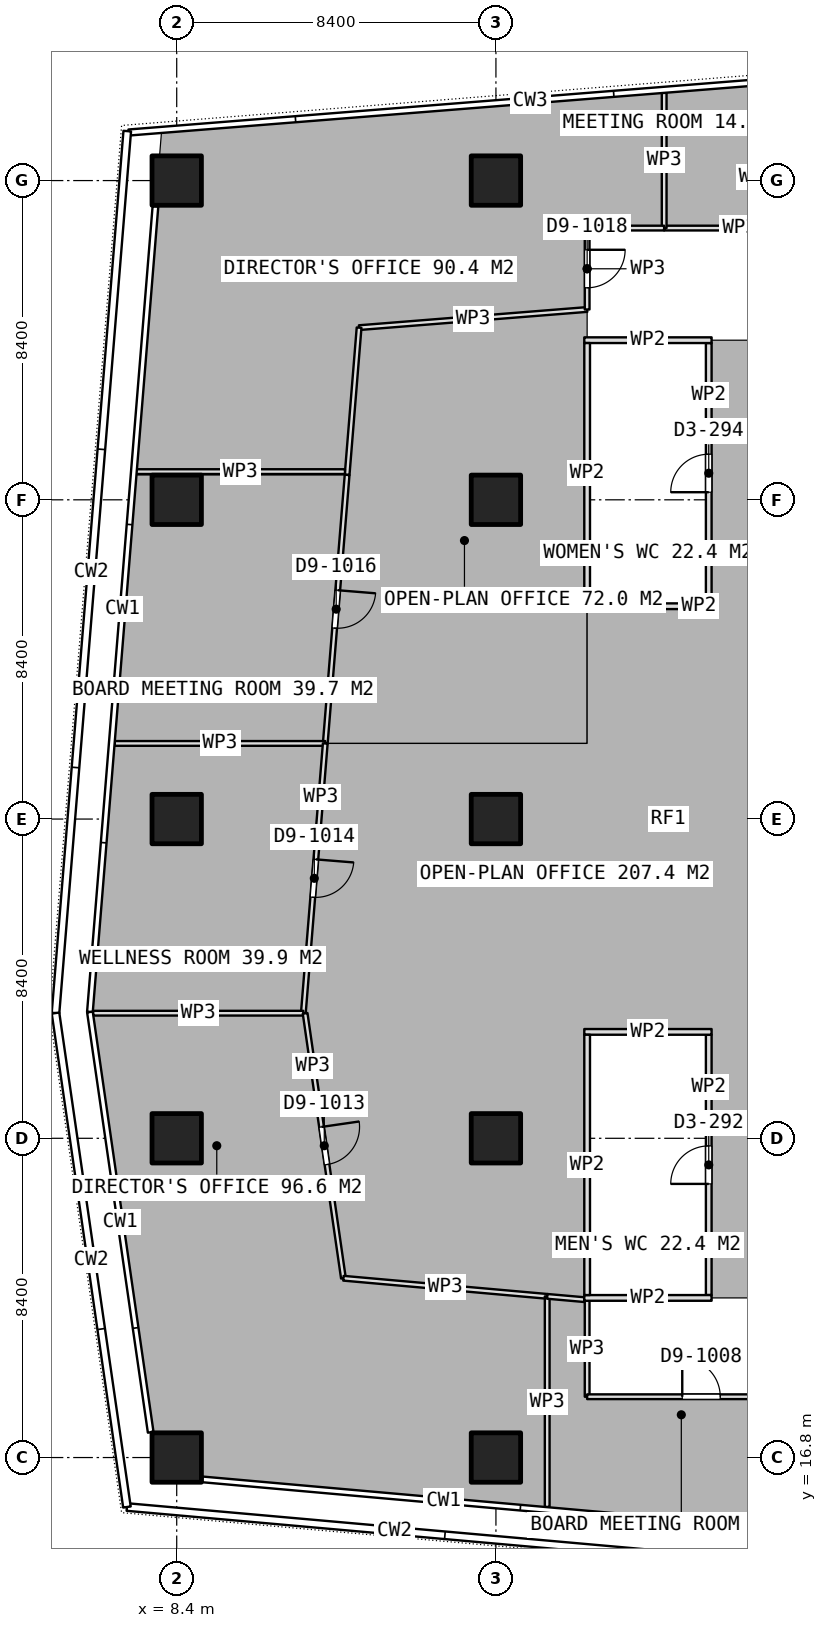
"""IFC4 building model, lengths in metres.
Left out: names, types, materials, properties, quantities, classifications, styles, units other than length and angle.
Written with IfcOpenShell. Run it as: python <this file> out.ifc"""

import sys

from ifc_helpers import new_model, si_unit, direction, frame, frame_2d, origin, origin_2d, place, context, subcontext, project, spatial, rectangle, extrude, element, fill, save


model = new_model("IFC4")
c1 = context("Model", 3, precision=1e-05, world=origin(), true_north=direction((0.0, 1.0)))
c2 = subcontext(c1, "Body", "Model", "MODEL_VIEW")
j1 = project(units=[si_unit("LENGTHUNIT", "METRE"), si_unit("PLANEANGLEUNIT", "RADIAN")], contexts=[c1])
p1 = place(None, origin())
s1 = spatial("IfcSite", under=j1, at=p1, CompositionType="ELEMENT")
p2 = place(p1, origin())
s2 = spatial("IfcBuilding", under=s1, at=p2, CompositionType="ELEMENT")
p3 = place(p2, frame((0.0, 0.0, 272.6)))
s3 = spatial("IfcBuildingStorey", under=s2, at=p3, CompositionType="ELEMENT", Elevation=272.6)
for number, where, z_axis, x_axis in (
    (1, (8.4, 16.8, 0.0), (0.0, 0.0, 1.0), (1.0, 0.0, 0.0)),
    (2, (8.4, 25.2, 0.0), (0.0, 0.0, 1.0), (1.0, 0.0, 0.0)),
    (3, (8.4, 33.6, 0.0), (0.0, 0.0, 1.0), (1.0, 0.0, 0.0)),
    (4, (8.4, 42.0, 0.0), (0.0, 0.0, 1.0), (1.0, 0.0, 0.0)),
    (5, (8.4, 50.4, 0.0), (0.0, 0.0, 1.0), (1.0, 0.0, 0.0)),
    (6, (16.8, 16.8, 0.0), (0.0, 0.0, 1.0), (1.0, 0.0, 0.0)),
    (7, (16.8, 25.2, 0.0), (0.0, 0.0, 1.0), (1.0, 0.0, 0.0)),
    (8, (16.8, 33.6, 0.0), (0.0, 0.0, 1.0), (1.0, 0.0, 0.0)),
    (9, (16.8, 42.0, 0.0), (0.0, 0.0, 1.0), (1.0, 0.0, 0.0)),
    (10, (16.8, 50.4, 0.0), (0.0, 0.0, 1.0), (1.0, 0.0, 0.0)),
):
    element("IfcColumn", number, at=place(p3, frame(where, z_axis=z_axis, x_axis=x_axis)), inside=s3, PredefinedType="COLUMN", context=c2, shape_type="SweptSolid", body=[
        extrude(rectangle(XDim=1.3, YDim=1.3, at=origin_2d()), origin(), (0.0, 0.0, 1.0), 3.75),
    ])
for number, where, z_axis, x_axis in (
    (11, (19.125, 39.2, 0.0), (0.0, 0.0, 1.0), (1.0, 0.0, 0.0)),
    (12, (19.125, 46.2, 0.0), (0.0, 0.0, 1.0), (1.0, 0.0, 0.0)),
):
    element("IfcWall", number, at=place(p3, frame(where, z_axis=z_axis, x_axis=x_axis)), inside=s3, PredefinedType="PARTITIONING", context=c2, shape_type="SweptSolid", body=[
        extrude(rectangle(XDim=3.35, YDim=0.15, at=frame_2d((1.675, 0.0))), origin(), (0.0, 0.0, 1.0), 3.5),
    ])
p4 = place(p3, frame((19.2, 39.275, 0.0), z_axis=(0.0, 0.0, 1.0), x_axis=(0.0, 1.0, 0.0)))
e13 = element("IfcWall", 13, at=p4, inside=s3, PredefinedType="PARTITIONING", context=c2, shape_type="SweptSolid", body=[
    extrude(rectangle(XDim=6.85, YDim=0.15, at=frame_2d((3.425, 0.0))), origin(), (0.0, 0.0, 1.0), 3.5),
])
p5 = place(p3, frame((22.4, 39.275, 0.0), z_axis=(0.0, 0.0, 1.0), x_axis=(0.0, 1.0, 0.0)))
e14 = element("IfcWall", 14, at=p5, inside=s3, PredefinedType="PARTITIONING", context=c2, shape_type="SweptSolid", body=[
    extrude(rectangle(XDim=6.85, YDim=0.15, at=frame_2d((3.425, 0.0))), origin(), (0.0, 0.0, 1.0), 3.5),
])
p6 = place(p5, frame((2.925, 0.0, 0.0)))
e15 = element("IfcOpeningElement", 15, at=p6, cuts=e14, PredefinedType="OPENING", context=c2, shape_type="SweptSolid", body=[
    extrude(rectangle(XDim=1.0, YDim=2.1, at=frame_2d((0.5, 1.05))), frame((0.0, 0.085, 0.0), z_axis=(0.0, -1.0, 0.0), x_axis=(1.0, 0.0, 0.0)), (0.0, 0.0, 1.0), 0.17),
])
for number, where, z_axis, x_axis in (
    (16, (19.125, 21.0, 0.0), (0.0, 0.0, 1.0), (1.0, 0.0, 0.0)),
    (17, (19.125, 28.0, 0.0), (0.0, 0.0, 1.0), (1.0, 0.0, 0.0)),
):
    element("IfcWall", number, at=place(p3, frame(where, z_axis=z_axis, x_axis=x_axis)), inside=s3, PredefinedType="PARTITIONING", context=c2, shape_type="SweptSolid", body=[
        extrude(rectangle(XDim=3.35, YDim=0.15, at=frame_2d((1.675, 0.0))), origin(), (0.0, 0.0, 1.0), 3.5),
    ])
p7 = place(p3, frame((19.2, 21.075, 0.0), z_axis=(0.0, 0.0, 1.0), x_axis=(0.0, 1.0, 0.0)))
e18 = element("IfcWall", 18, at=p7, inside=s3, PredefinedType="PARTITIONING", context=c2, shape_type="SweptSolid", body=[
    extrude(rectangle(XDim=6.85, YDim=0.15, at=frame_2d((3.425, 0.0))), origin(), (0.0, 0.0, 1.0), 3.5),
])
p8 = place(p3, frame((22.4, 21.075, 0.0), z_axis=(0.0, 0.0, 1.0), x_axis=(0.0, 1.0, 0.0)))
e19 = element("IfcWall", 19, at=p8, inside=s3, PredefinedType="PARTITIONING", context=c2, shape_type="SweptSolid", body=[
    extrude(rectangle(XDim=6.85, YDim=0.15, at=frame_2d((3.425, 0.0))), origin(), (0.0, 0.0, 1.0), 3.5),
])
p9 = place(p8, frame((2.925, 0.0, 0.0)))
e20 = element("IfcOpeningElement", 20, at=p9, cuts=e19, PredefinedType="OPENING", context=c2, shape_type="SweptSolid", body=[
    extrude(rectangle(XDim=1.0, YDim=2.1, at=frame_2d((0.5, 1.05))), frame((0.0, 0.085, 0.0), z_axis=(0.0, -1.0, 0.0), x_axis=(1.0, 0.0, 0.0)), (0.0, 0.0, 1.0), 0.17),
])
p10 = place(p3, frame((25.205, 49.15, 0.0), z_axis=(0.0, 0.0, 1.0), x_axis=(-1.0, 0.0, 0.0)))
e21 = element("IfcWall", 21, at=p10, inside=s3, PredefinedType="PARTITIONING", context=c2, shape_type="SweptSolid", body=[
    extrude(rectangle(XDim=3.978, YDim=0.125, at=frame_2d((1.989, 0.0))), origin(), (0.0, 0.0, 1.0), 3.5),
])
p11 = place(p3, frame((21.227, 49.15, 0.0), z_axis=(0.0, 0.0, 1.0), x_axis=(0.0, 1.0, 0.0)))
e22 = element("IfcWall", 22, at=p11, inside=s3, PredefinedType="PARTITIONING", context=c2, shape_type="SweptSolid", body=[
    extrude(rectangle(XDim=3.558, YDim=0.125, at=frame_2d((1.779, 0.0))), origin(), (0.0, 0.0, 1.0), 3.5),
])
p12 = place(p3, frame((19.2, 47.008, 0.0), z_axis=(0.0, 0.0, 1.0), x_axis=(-0.996842300725, -0.079406721921, 0.0)))
e23 = element("IfcWall", 23, at=p12, inside=s3, PredefinedType="PARTITIONING", context=c2, shape_type="SweptSolid", body=[
    extrude(rectangle(XDim=6.02, YDim=0.125, at=frame_2d((3.01, 0.0))), origin(), (0.0, 0.0, 1.0), 3.5),
])
p13 = place(p3, frame((13.199, 46.53, 0.0), z_axis=(0.0, 0.0, 1.0), x_axis=(-0.081048669132, -0.996710145043, 0.0)))
e24 = element("IfcWall", 24, at=p13, inside=s3, PredefinedType="PARTITIONING", context=c2, shape_type="SweptSolid", body=[
    extrude(rectangle(XDim=3.886, YDim=0.125, at=frame_2d((1.943, 0.0))), origin(), (0.0, 0.0, 1.0), 3.5),
])
p14 = place(p3, frame((12.828, 42.742, 0.0), z_axis=(0.0, 0.0, 1.0), x_axis=(-1.0, 0.0, 0.0)))
e25 = element("IfcWall", 25, at=p14, inside=s3, PredefinedType="PARTITIONING", context=c2, shape_type="SweptSolid", body=[
    extrude(rectangle(XDim=5.505, YDim=0.125, at=frame_2d((2.752, 0.0))), origin(), (0.0, 0.0, 1.0), 3.5),
])
p15 = place(p3, frame((21.226, 49.15, 0.0), z_axis=(0.0, 0.0, 1.0), x_axis=(-1.0, 0.0, 0.0)))
e26 = element("IfcWall", 26, at=p15, inside=s3, PredefinedType="PARTITIONING", context=c2, shape_type="SweptSolid", body=[
    extrude(rectangle(XDim=2.026, YDim=0.125, at=frame_2d((1.013, 0.0))), origin(), (0.0, 0.0, 1.0), 3.5),
])
p16 = place(p3, frame((19.2, 49.15, 0.0), z_axis=(0.0, 0.0, 1.0), x_axis=(0.0, -1.0, 0.0)))
e27 = element("IfcWall", 27, at=p16, inside=s3, PredefinedType="PARTITIONING", context=c2, shape_type="SweptSolid", body=[
    extrude(rectangle(XDim=2.142, YDim=0.125, at=frame_2d((1.071, 0.0))), origin(), (0.0, 0.0, 1.0), 3.5),
])
p17 = place(p16, frame((0.571, 0.0, 0.0)))
e28 = element("IfcOpeningElement", 28, at=p17, cuts=e27, PredefinedType="OPENING", context=c2, shape_type="SweptSolid", body=[
    extrude(rectangle(XDim=1.0, YDim=2.1, at=frame_2d((0.5, 1.05))), frame((0.0, 0.073, 0.0), z_axis=(0.0, -1.0, 0.0), x_axis=(1.0, 0.0, 0.0)), (0.0, 0.0, 1.0), 0.145),
])
p18 = place(p3, frame((12.884, 42.656, 0.0), z_axis=(0.0, 0.0, 1.0), x_axis=(-0.08110159124, -0.996705840205, 0.0)))
e29 = element("IfcWall", 29, at=p18, inside=s3, PredefinedType="PARTITIONING", context=c2, shape_type="SweptSolid", body=[
    extrude(rectangle(XDim=7.089, YDim=0.125, at=frame_2d((3.545, 0.0))), origin(), (0.0, 0.0, 1.0), 3.5),
])
p19 = place(p18, frame((3.045, 0.0, 0.0)))
e30 = element("IfcOpeningElement", 30, at=p19, cuts=e29, PredefinedType="OPENING", context=c2, shape_type="SweptSolid", body=[
    extrude(rectangle(XDim=1.0, YDim=2.1, at=frame_2d((0.5, 1.05))), frame((0.0, 0.073, 0.0), z_axis=(0.0, -1.0, 0.0), x_axis=(1.0, 0.0, 0.0)), (0.0, 0.0, 1.0), 0.145),
])
p20 = place(p3, frame((12.309, 35.59, 0.0), z_axis=(0.0, 0.0, 1.0), x_axis=(-1.0, 0.0, 0.0)))
e31 = element("IfcWall", 31, at=p20, inside=s3, PredefinedType="PARTITIONING", context=c2, shape_type="SweptSolid", body=[
    extrude(rectangle(XDim=5.538, YDim=0.125, at=frame_2d((2.769, 0.0))), origin(), (0.0, 0.0, 1.0), 3.5),
])
p21 = place(p3, frame((12.309, 35.589, 0.0), z_axis=(0.0, 0.0, 1.0), x_axis=(-0.081053384124, -0.996709761627, 0.0)))
e32 = element("IfcWall", 32, at=p21, inside=s3, PredefinedType="PARTITIONING", context=c2, shape_type="SweptSolid", body=[
    extrude(rectangle(XDim=7.121, YDim=0.125, at=frame_2d((3.56, 0.0))), origin(), (0.0, 0.0, 1.0), 3.5),
])
p22 = place(p21, frame((3.06, 0.0, 0.0)))
e33 = element("IfcOpeningElement", 33, at=p22, cuts=e32, PredefinedType="OPENING", context=c2, shape_type="SweptSolid", body=[
    extrude(rectangle(XDim=1.0, YDim=2.1, at=frame_2d((0.5, 1.05))), frame((0.0, 0.073, 0.0), z_axis=(0.0, -1.0, 0.0), x_axis=(1.0, 0.0, 0.0)), (0.0, 0.0, 1.0), 0.145),
])
p23 = place(p3, frame((11.732, 28.492, 0.0), z_axis=(0.0, 0.0, 1.0), x_axis=(-1.0, 0.0, 0.0)))
e34 = element("IfcWall", 34, at=p23, inside=s3, PredefinedType="PARTITIONING", context=c2, shape_type="SweptSolid", body=[
    extrude(rectangle(XDim=5.531, YDim=0.125, at=frame_2d((2.766, 0.0))), origin(), (0.0, 0.0, 1.0), 3.5),
])
p24 = place(p3, frame((11.779, 28.488, 0.0), z_axis=(0.0, 0.0, 1.0), x_axis=(0.143139230014, -0.989702561799, 0.0)))
e35 = element("IfcWall", 35, at=p24, inside=s3, PredefinedType="PARTITIONING", context=c2, shape_type="SweptSolid", body=[
    extrude(rectangle(XDim=7.042, YDim=0.125, at=frame_2d((3.521, 0.0))), origin(), (0.0, 0.0, 1.0), 3.5),
])
p25 = place(p24, frame((3.02, 0.0, 0.0)))
e36 = element("IfcOpeningElement", 36, at=p25, cuts=e35, PredefinedType="OPENING", context=c2, shape_type="SweptSolid", body=[
    extrude(rectangle(XDim=1.0, YDim=2.1, at=frame_2d((0.5, 1.05))), frame((0.0, 0.073, 0.0), z_axis=(0.0, -1.0, 0.0), x_axis=(1.0, 0.0, 0.0)), (0.0, 0.0, 1.0), 0.145),
])
p26 = place(p3, frame((12.787, 21.518, 0.0), z_axis=(0.0, 0.0, 1.0), x_axis=(0.996065348673, -0.088621787237, 0.0)))
e37 = element("IfcWall", 37, at=p26, inside=s3, PredefinedType="PARTITIONING", context=c2, shape_type="SweptSolid", body=[
    extrude(rectangle(XDim=5.383, YDim=0.125, at=frame_2d((2.691, 0.0))), origin(), (0.0, 0.0, 1.0), 3.5),
])
p27 = place(p3, frame((18.149, 21.041, 0.0), z_axis=(0.0, 0.0, 1.0), x_axis=(0.0, -1.0, 0.0)))
e38 = element("IfcWall", 38, at=p27, inside=s3, PredefinedType="PARTITIONING", context=c2, shape_type="SweptSolid", body=[
    extrude(rectangle(XDim=5.541, YDim=0.125, at=frame_2d((2.771, 0.0))), origin(), (0.0, 0.0, 1.0), 3.5),
])
p28 = place(p3, frame((18.15, 21.041, 0.0), z_axis=(0.0, 0.0, 1.0), x_axis=(0.996138836376, -0.087791905459, 0.0)))
e39 = element("IfcWall", 39, at=p28, inside=s3, PredefinedType="PARTITIONING", context=c2, shape_type="SweptSolid", body=[
    extrude(rectangle(XDim=0.979, YDim=0.125, at=frame_2d((0.489, 0.0))), origin(), (0.0, 0.0, 1.0), 3.5),
])
p29 = place(p3, frame((19.2, 20.925, 0.0), z_axis=(0.0, 0.0, 1.0), x_axis=(0.0, -1.0, 0.0)))
e40 = element("IfcWall", 40, at=p29, inside=s3, PredefinedType="PARTITIONING", context=c2, shape_type="SweptSolid", body=[
    extrude(rectangle(XDim=2.525, YDim=0.125, at=frame_2d((1.263, 0.0))), origin(), (0.0, 0.0, 1.0), 3.5),
])
p30 = place(p3, frame((19.2, 18.4, 0.0), z_axis=(0.0, 0.0, 1.0), x_axis=(1.0, 0.0, 0.0)))
e41 = element("IfcWall", 41, at=p30, inside=s3, PredefinedType="PARTITIONING", context=c2, shape_type="SweptSolid", body=[
    extrude(rectangle(XDim=6.006, YDim=0.125, at=frame_2d((3.003, 0.0))), origin(), (0.0, 0.0, 1.0), 3.5),
])
p31 = place(p30, frame((2.503, 0.0, 0.0)))
e42 = element("IfcOpeningElement", 42, at=p31, cuts=e41, PredefinedType="OPENING", context=c2, shape_type="SweptSolid", body=[
    extrude(rectangle(XDim=1.0, YDim=2.1, at=frame_2d((0.5, 1.05))), frame((0.0, 0.073, 0.0), z_axis=(0.0, -1.0, 0.0), x_axis=(1.0, 0.0, 0.0)), (0.0, 0.0, 1.0), 0.145),
])
p32 = place(p6, origin())
e43 = element("IfcDoor", 43, at=p32, inside=s3, OperationType="SINGLE_SWING_LEFT", PredefinedType="DOOR", context=c2, shape_type="SweptSolid", body=[
    extrude(rectangle(XDim=1.0, YDim=2.1, at=frame_2d((0.5, 1.05))), frame((0.0, 0.025, 0.0), z_axis=(0.0, -1.0, 0.0), x_axis=(1.0, 0.0, 0.0)), (0.0, 0.0, 1.0), 0.05),
])
fill(e15, e43)
p33 = place(p9, origin())
e44 = element("IfcDoor", 44, at=p33, inside=s3, OperationType="SINGLE_SWING_LEFT", PredefinedType="DOOR", context=c2, shape_type="SweptSolid", body=[
    extrude(rectangle(XDim=1.0, YDim=2.1, at=frame_2d((0.5, 1.05))), frame((0.0, 0.025, 0.0), z_axis=(0.0, -1.0, 0.0), x_axis=(1.0, 0.0, 0.0)), (0.0, 0.0, 1.0), 0.05),
])
fill(e20, e44)
p34 = place(p17, origin())
e45 = element("IfcDoor", 45, at=p34, inside=s3, OperationType="SINGLE_SWING_LEFT", PredefinedType="DOOR", context=c2, shape_type="SweptSolid", body=[
    extrude(rectangle(XDim=1.0, YDim=2.1, at=frame_2d((0.5, 1.05))), frame((0.0, 0.025, 0.0), z_axis=(0.0, -1.0, 0.0), x_axis=(1.0, 0.0, 0.0)), (0.0, 0.0, 1.0), 0.05),
])
fill(e28, e45)
p35 = place(p19, origin())
e46 = element("IfcDoor", 46, at=p35, inside=s3, OperationType="SINGLE_SWING_LEFT", PredefinedType="DOOR", context=c2, shape_type="SweptSolid", body=[
    extrude(rectangle(XDim=1.0, YDim=2.1, at=frame_2d((0.5, 1.05))), frame((0.0, 0.025, 0.0), z_axis=(0.0, -1.0, 0.0), x_axis=(1.0, 0.0, 0.0)), (0.0, 0.0, 1.0), 0.05),
])
fill(e30, e46)
p36 = place(p22, origin())
e47 = element("IfcDoor", 47, at=p36, inside=s3, OperationType="SINGLE_SWING_LEFT", PredefinedType="DOOR", context=c2, shape_type="SweptSolid", body=[
    extrude(rectangle(XDim=1.0, YDim=2.1, at=frame_2d((0.5, 1.05))), frame((0.0, 0.025, 0.0), z_axis=(0.0, -1.0, 0.0), x_axis=(1.0, 0.0, 0.0)), (0.0, 0.0, 1.0), 0.05),
])
fill(e33, e47)
p37 = place(p25, origin())
e48 = element("IfcDoor", 48, at=p37, inside=s3, OperationType="SINGLE_SWING_LEFT", PredefinedType="DOOR", context=c2, shape_type="SweptSolid", body=[
    extrude(rectangle(XDim=1.0, YDim=2.1, at=frame_2d((0.5, 1.05))), frame((0.0, 0.025, 0.0), z_axis=(0.0, -1.0, 0.0), x_axis=(1.0, 0.0, 0.0)), (0.0, 0.0, 1.0), 0.05),
])
fill(e36, e48)
p38 = place(p31, origin())
e49 = element("IfcDoor", 49, at=p38, inside=s3, OperationType="SINGLE_SWING_LEFT", PredefinedType="DOOR", context=c2, shape_type="SweptSolid", body=[
    extrude(rectangle(XDim=1.0, YDim=2.1, at=frame_2d((0.5, 1.05))), frame((0.0, 0.025, 0.0), z_axis=(0.0, -1.0, 0.0), x_axis=(1.0, 0.0, 0.0)), (0.0, 0.0, 1.0), 0.05),
])
fill(e42, e49)
save(model, sys.argv[1])
